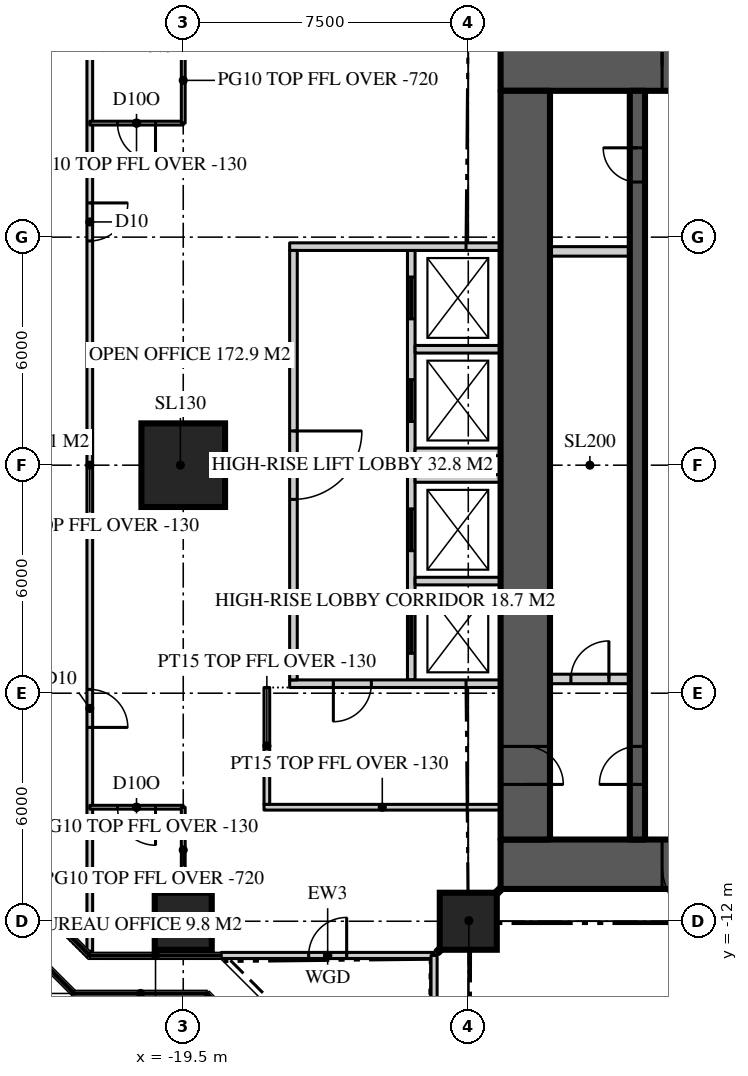
"""IFC4 building model, lengths in metres.
Left out: names, types, materials, properties, quantities, classifications, styles, units other than length and angle.
Written with IfcOpenShell. Run it as: python <this file> out.ifc"""

import sys

from ifc_helpers import new_model, si_unit, direction, frame, frame_2d, origin, origin_2d, place, context, subcontext, project, spatial, rectangle, extrude, element, fill, save


model = new_model("IFC4")
c1 = context("Model", 3, precision=1e-05, world=origin(), true_north=direction((0.0, 1.0)))
c2 = subcontext(c1, "Body", "Model", "MODEL_VIEW")
j1 = project(units=[si_unit("LENGTHUNIT", "METRE"), si_unit("PLANEANGLEUNIT", "RADIAN")], contexts=[c1])
p1 = place(None, origin())
s1 = spatial("IfcSite", under=j1, at=p1, CompositionType="ELEMENT")
p2 = place(p1, origin())
s2 = spatial("IfcBuilding", under=s1, at=p2, CompositionType="ELEMENT")
p3 = place(p2, frame((0.0, 0.0, 240.0)))
s3 = spatial("IfcBuildingStorey", under=s2, at=p3, CompositionType="ELEMENT", Elevation=240.0)
p4 = place(p3, frame((-11.15, 10.5, 0.0), z_axis=(0.0, 0.0, 1.0), x_axis=(1.0, 0.0, 0.0)))
e1 = element("IfcWall", 1, at=p4, inside=s3, PredefinedType="SHEAR", context=c2, shape_type="SweptSolid", body=[
    extrude(rectangle(XDim=22.3, YDim=1.3, at=frame_2d((11.15, 0.0))), origin(), (0.0, 0.0, 1.0), 3.9),
])
p5 = place(p4, frame((4.25, 0.0, 0.0)))
e2 = element("IfcOpeningElement", 2, at=p5, cuts=e1, PredefinedType="OPENING", context=c2, shape_type="SweptSolid", body=[
    extrude(rectangle(XDim=1.8, YDim=2.2, at=frame_2d((0.9, 1.1))), frame((0.0, 0.66, 0.0), z_axis=(0.0, -1.0, 0.0), x_axis=(1.0, 0.0, 0.0)), (0.0, 0.0, 1.0), 1.32),
])
p6 = place(p4, frame((16.25, 0.0, 0.0)))
e3 = element("IfcOpeningElement", 3, at=p6, cuts=e1, PredefinedType="OPENING", context=c2, shape_type="SweptSolid", body=[
    extrude(rectangle(XDim=1.8, YDim=2.2, at=frame_2d((0.9, 1.1))), frame((0.0, 0.66, 0.0), z_axis=(0.0, -1.0, 0.0), x_axis=(1.0, 0.0, 0.0)), (0.0, 0.0, 1.0), 1.32),
])
p7 = place(p3, frame((11.15, -10.5, 0.0), z_axis=(0.0, 0.0, 1.0), x_axis=(-1.0, 0.0, 0.0)))
e4 = element("IfcWall", 4, at=p7, inside=s3, PredefinedType="SHEAR", context=c2, shape_type="SweptSolid", body=[
    extrude(rectangle(XDim=22.3, YDim=1.3, at=frame_2d((11.15, 0.0))), origin(), (0.0, 0.0, 1.0), 3.9),
])
p8 = place(p7, frame((16.25, 0.0, 0.0)))
e5 = element("IfcOpeningElement", 5, at=p8, cuts=e4, PredefinedType="OPENING", context=c2, shape_type="SweptSolid", body=[
    extrude(rectangle(XDim=1.8, YDim=2.2, at=frame_2d((0.9, 1.1))), frame((0.0, 0.66, 0.0), z_axis=(0.0, -1.0, 0.0), x_axis=(1.0, 0.0, 0.0)), (0.0, 0.0, 1.0), 1.32),
])
p9 = place(p7, frame((4.25, 0.0, 0.0)))
e6 = element("IfcOpeningElement", 6, at=p9, cuts=e4, PredefinedType="OPENING", context=c2, shape_type="SweptSolid", body=[
    extrude(rectangle(XDim=1.8, YDim=2.2, at=frame_2d((0.9, 1.1))), frame((0.0, 0.66, 0.0), z_axis=(0.0, -1.0, 0.0), x_axis=(1.0, 0.0, 0.0)), (0.0, 0.0, 1.0), 1.32),
])
p10 = place(p3, frame((-10.5, 9.85, 0.0), z_axis=(0.0, 0.0, 1.0), x_axis=(0.0, -1.0, 0.0)))
e7 = element("IfcWall", 7, at=p10, inside=s3, PredefinedType="SHEAR", context=c2, shape_type="SweptSolid", body=[
    extrude(rectangle(XDim=19.7, YDim=1.3, at=frame_2d((9.85, 0.0))), origin(), (0.0, 0.0, 1.0), 3.9),
])
p11 = place(p10, frame((17.25, 0.0, 0.0)))
e8 = element("IfcOpeningElement", 8, at=p11, cuts=e7, PredefinedType="OPENING", context=c2, shape_type="SweptSolid", body=[
    extrude(rectangle(XDim=1.0, YDim=2.2, at=frame_2d((0.5, 1.1))), frame((0.0, 0.66, 0.0), z_axis=(0.0, -1.0, 0.0), x_axis=(1.0, 0.0, 0.0)), (0.0, 0.0, 1.0), 1.32),
])
for number, where, z_axis, x_axis in (
    (9, (-19.5, -12.0, 0.0), (0.0, 0.0, 1.0), (1.0, 0.0, 0.0)),
    (10, (-12.0, -12.0, 0.0), (0.0, 0.0, 1.0), (1.0, 0.0, 0.0)),
):
    element("IfcColumn", number, at=place(p3, frame(where, z_axis=z_axis, x_axis=x_axis)), inside=s3, PredefinedType="COLUMN", context=c2, shape_type="SweptSolid", body=[
        extrude(rectangle(XDim=1.5, YDim=1.5, at=origin_2d()), origin(), (0.0, 0.0, 1.0), 3.9),
    ])
p12 = place(p3, frame((-19.5, 0.0, 0.0), z_axis=(0.0, 0.0, 1.0), x_axis=(1.0, 0.0, 0.0)))
e11 = element("IfcColumn", 11, at=p12, inside=s3, PredefinedType="COLUMN", context=c2, shape_type="SweptSolid", body=[
    extrude(rectangle(XDim=2.2, YDim=2.2, at=origin_2d()), origin(), (0.0, 0.0, 1.0), 3.9),
])
p13 = place(p3, frame((-18.5, -12.9, 0.0), z_axis=(0.0, 0.0, 1.0), x_axis=(1.0, 0.0, 0.0)))
e12 = element("IfcWall", 12, at=p13, inside=s3, PredefinedType="SOLIDWALL", context=c2, shape_type="SweptSolid", body=[
    extrude(rectangle(XDim=5.6, YDim=0.16, at=frame_2d((2.8, 0.0))), origin(), (0.0, 0.0, 1.0), 3.77),
])
p14 = place(p13, frame((2.3, 0.0, 0.0)))
e13 = element("IfcOpeningElement", 13, at=p14, cuts=e12, PredefinedType="OPENING", context=c2, shape_type="SweptSolid", body=[
    extrude(rectangle(XDim=1.0, YDim=2.2, at=frame_2d((0.5, 1.1))), frame((0.0, 0.09, 0.0), z_axis=(0.0, -1.0, 0.0), x_axis=(1.0, 0.0, 0.0)), (0.0, 0.0, 1.0), 0.18),
])
p15 = place(p3, frame((-12.9, -12.9, 0.0), z_axis=(0.0, 0.0, 1.0), x_axis=(0.0, -1.0, 0.0)))
e14 = element("IfcWall", 14, at=p15, inside=s3, PredefinedType="SOLIDWALL", context=c2, shape_type="SweptSolid", body=[
    extrude(rectangle(XDim=5.6, YDim=0.16, at=frame_2d((2.8, 0.0))), origin(), (0.0, 0.0, 1.0), 3.77),
])
p16 = place(p3, frame((-7.55, -9.85, 0.0), z_axis=(0.0, 0.0, 1.0), x_axis=(0.0, 1.0, 0.0)))
e15 = element("IfcWall", 15, at=p16, inside=s3, PredefinedType="SHEAR", context=c2, shape_type="SweptSolid", body=[
    extrude(rectangle(XDim=19.7, YDim=0.4, at=frame_2d((9.85, 0.0))), origin(), (0.0, 0.0, 1.0), 3.9),
])
p17 = place(p16, frame((1.45, 0.0, 0.0)))
e16 = element("IfcOpeningElement", 16, at=p17, cuts=e15, PredefinedType="OPENING", context=c2, shape_type="SweptSolid", body=[
    extrude(rectangle(XDim=1.0, YDim=2.2, at=frame_2d((0.5, 1.1))), frame((0.0, 0.21, 0.0), z_axis=(0.0, -1.0, 0.0), x_axis=(1.0, 0.0, 0.0)), (0.0, 0.0, 1.0), 0.42),
])
p18 = place(p16, frame((17.3, 0.0, 0.0)))
e17 = element("IfcOpeningElement", 17, at=p18, cuts=e15, PredefinedType="OPENING", context=c2, shape_type="SweptSolid", body=[
    extrude(rectangle(XDim=0.9, YDim=2.1, at=frame_2d((0.45, 1.05))), frame((0.0, 0.21, 0.0), z_axis=(0.0, -1.0, 0.0), x_axis=(1.0, 0.0, 0.0)), (0.0, 0.0, 1.0), 0.42),
])
p19 = place(p3, frame((-9.85, 5.625, 0.0), z_axis=(0.0, 0.0, 1.0), x_axis=(1.0, 0.0, 0.0)))
e18 = element("IfcWall", 18, at=p19, inside=s3, PredefinedType="SOLIDWALL", context=c2, shape_type="SweptSolid", body=[
    extrude(rectangle(XDim=2.1, YDim=0.25, at=frame_2d((1.05, 0.0))), origin(), (0.0, 0.0, 1.0), 3.7),
])
p20 = place(p3, frame((-9.85, -5.625, 0.0), z_axis=(0.0, 0.0, 1.0), x_axis=(1.0, 0.0, 0.0)))
e19 = element("IfcWall", 19, at=p20, inside=s3, PredefinedType="SOLIDWALL", context=c2, shape_type="SweptSolid", body=[
    extrude(rectangle(XDim=2.1, YDim=0.25, at=frame_2d((1.05, 0.0))), origin(), (0.0, 0.0, 1.0), 3.7),
])
p21 = place(p20, frame((0.55, 0.0, 0.0)))
e20 = element("IfcOpeningElement", 20, at=p21, cuts=e19, PredefinedType="OPENING", context=c2, shape_type="SweptSolid", body=[
    extrude(rectangle(XDim=1.0, YDim=2.2, at=frame_2d((0.5, 1.1))), frame((0.0, 0.135, 0.0), z_axis=(0.0, -1.0, 0.0), x_axis=(1.0, 0.0, 0.0)), (0.0, 0.0, 1.0), 0.27),
])
p22 = place(p3, frame((-21.959, 12.786, 0.0), z_axis=(0.0, 0.0, 1.0), x_axis=(0.0, -1.0, 0.0)))
e21 = element("IfcWall", 21, at=p22, inside=s3, PredefinedType="PARTITIONING", context=c2, shape_type="SweptSolid", body=[
    extrude(rectangle(XDim=25.573, YDim=0.15, at=frame_2d((12.786, 0.0))), origin(), (0.0, 0.0, 1.0), 3.77),
])
p23 = place(p22, frame((18.687, 0.0, 0.0)))
e22 = element("IfcOpeningElement", 22, at=p23, cuts=e21, PredefinedType="OPENING", context=c2, shape_type="SweptSolid", body=[
    extrude(rectangle(XDim=1.0, YDim=2.2, at=frame_2d((0.5, 1.1))), frame((0.0, 0.085, 0.0), z_axis=(0.0, -1.0, 0.0), x_axis=(1.0, 0.0, 0.0)), (0.0, 0.0, 1.0), 0.17),
])
p24 = place(p22, frame((5.886, 0.0, 0.0)))
e23 = element("IfcOpeningElement", 23, at=p24, cuts=e21, PredefinedType="OPENING", context=c2, shape_type="SweptSolid", body=[
    extrude(rectangle(XDim=1.0, YDim=2.2, at=frame_2d((0.5, 1.1))), frame((0.0, 0.085, 0.0), z_axis=(0.0, -1.0, 0.0), x_axis=(1.0, 0.0, 0.0)), (0.0, 0.0, 1.0), 0.17),
])
p25 = place(p3, frame((-19.5, -9.0, 0.0), z_axis=(0.0, 0.0, 1.0), x_axis=(-1.0, 0.0, 0.0)))
e24 = element("IfcWall", 24, at=p25, inside=s3, PredefinedType="PARTITIONING", context=c2, shape_type="SweptSolid", body=[
    extrude(rectangle(XDim=2.459, YDim=0.1, at=frame_2d((1.229, 0.0))), origin(), (0.0, 0.0, 1.0), 3.77),
])
p26 = place(p25, frame((0.729, 0.0, 0.0)))
e25 = element("IfcOpeningElement", 25, at=p26, cuts=e24, PredefinedType="OPENING", context=c2, shape_type="SweptSolid", body=[
    extrude(rectangle(XDim=1.0, YDim=2.2, at=frame_2d((0.5, 1.1))), frame((0.0, 0.06, 0.0), z_axis=(0.0, -1.0, 0.0), x_axis=(1.0, 0.0, 0.0)), (0.0, 0.0, 1.0), 0.12),
])
p27 = place(p3, frame((-19.5, -9.0, 0.0), z_axis=(0.0, 0.0, 1.0), x_axis=(0.0, -1.0, 0.0)))
e26 = element("IfcWall", 26, at=p27, inside=s3, PredefinedType="PARTITIONING", context=c2, shape_type="SweptSolid", body=[
    extrude(rectangle(XDim=2.25, YDim=0.1, at=frame_2d((1.125, 0.0))), origin(), (0.0, 0.0, 1.0), 3.18),
])
p28 = place(p3, frame((-19.5, 9.0, 0.0), z_axis=(0.0, 0.0, 1.0), x_axis=(-1.0, 0.0, 0.0)))
e27 = element("IfcWall", 27, at=p28, inside=s3, PredefinedType="PARTITIONING", context=c2, shape_type="SweptSolid", body=[
    extrude(rectangle(XDim=2.459, YDim=0.1, at=frame_2d((1.229, 0.0))), origin(), (0.0, 0.0, 1.0), 3.77),
])
p29 = place(p28, frame((0.729, 0.0, 0.0)))
e28 = element("IfcOpeningElement", 28, at=p29, cuts=e27, PredefinedType="OPENING", context=c2, shape_type="SweptSolid", body=[
    extrude(rectangle(XDim=1.0, YDim=2.2, at=frame_2d((0.5, 1.1))), frame((0.0, 0.06, 0.0), z_axis=(0.0, -1.0, 0.0), x_axis=(1.0, 0.0, 0.0)), (0.0, 0.0, 1.0), 0.12),
])
p30 = place(p3, frame((-19.5, 9.0, 0.0), z_axis=(0.0, 0.0, 1.0), x_axis=(0.0, 1.0, 0.0)))
e29 = element("IfcWall", 29, at=p30, inside=s3, PredefinedType="PARTITIONING", context=c2, shape_type="SweptSolid", body=[
    extrude(rectangle(XDim=2.25, YDim=0.1, at=frame_2d((1.125, 0.0))), origin(), (0.0, 0.0, 1.0), 3.18),
])
p31 = place(p3, frame((-13.5, 5.65, 0.0), z_axis=(0.0, 0.0, 1.0), x_axis=(0.0, -1.0, 0.0)))
e30 = element("IfcWall", 30, at=p31, inside=s3, PredefinedType="SOLIDWALL", context=c2, shape_type="SweptSolid", body=[
    extrude(rectangle(XDim=11.3, YDim=0.2, at=frame_2d((5.65, 0.0))), origin(), (0.0, 0.0, 1.0), 3.7),
])
p32 = place(p31, frame((0.7, 0.0, 0.0)))
e31 = element("IfcOpeningElement", 31, at=p32, cuts=e30, PredefinedType="OPENING", context=c2, shape_type="SweptSolid", body=[
    extrude(rectangle(XDim=1.1, YDim=2.2, at=frame_2d((0.55, 1.1))), frame((0.0, 0.11, 0.0), z_axis=(0.0, -1.0, 0.0), x_axis=(1.0, 0.0, 0.0)), (0.0, 0.0, 1.0), 0.22),
])
p33 = place(p31, frame((3.4, 0.0, 0.0)))
e32 = element("IfcOpeningElement", 32, at=p33, cuts=e30, PredefinedType="OPENING", context=c2, shape_type="SweptSolid", body=[
    extrude(rectangle(XDim=1.1, YDim=2.2, at=frame_2d((0.55, 1.1))), frame((0.0, 0.11, 0.0), z_axis=(0.0, -1.0, 0.0), x_axis=(1.0, 0.0, 0.0)), (0.0, 0.0, 1.0), 0.22),
])
p34 = place(p31, frame((6.8, 0.0, 0.0)))
e33 = element("IfcOpeningElement", 33, at=p34, cuts=e30, PredefinedType="OPENING", context=c2, shape_type="SweptSolid", body=[
    extrude(rectangle(XDim=1.1, YDim=2.2, at=frame_2d((0.55, 1.1))), frame((0.0, 0.11, 0.0), z_axis=(0.0, -1.0, 0.0), x_axis=(1.0, 0.0, 0.0)), (0.0, 0.0, 1.0), 0.22),
])
p35 = place(p31, frame((9.5, 0.0, 0.0)))
e34 = element("IfcOpeningElement", 34, at=p35, cuts=e30, PredefinedType="OPENING", context=c2, shape_type="SweptSolid", body=[
    extrude(rectangle(XDim=1.1, YDim=2.2, at=frame_2d((0.55, 1.1))), frame((0.0, 0.11, 0.0), z_axis=(0.0, -1.0, 0.0), x_axis=(1.0, 0.0, 0.0)), (0.0, 0.0, 1.0), 0.22),
])
p36 = place(p3, frame((-11.15, 5.75, 0.0), z_axis=(0.0, 0.0, 1.0), x_axis=(-1.0, 0.0, 0.0)))
e35 = element("IfcWall", 35, at=p36, inside=s3, PredefinedType="SOLIDWALL", context=c2, shape_type="SweptSolid", body=[
    extrude(rectangle(XDim=5.55, YDim=0.2, at=frame_2d((2.775, 0.0))), origin(), (0.0, 0.0, 1.0), 3.7),
])
p37 = place(p3, frame((-11.15, -5.75, 0.0), z_axis=(0.0, 0.0, 1.0), x_axis=(-1.0, 0.0, 0.0)))
e36 = element("IfcWall", 36, at=p37, inside=s3, PredefinedType="SOLIDWALL", context=c2, shape_type="SweptSolid", body=[
    extrude(rectangle(XDim=5.55, YDim=0.2, at=frame_2d((2.775, 0.0))), origin(), (0.0, 0.0, 1.0), 3.7),
])
p38 = place(p37, frame((3.4, 0.0, 0.0)))
e37 = element("IfcOpeningElement", 37, at=p38, cuts=e36, PredefinedType="OPENING", context=c2, shape_type="SweptSolid", body=[
    extrude(rectangle(XDim=1.0, YDim=2.2, at=frame_2d((0.5, 1.1))), frame((0.0, 0.11, 0.0), z_axis=(0.0, -1.0, 0.0), x_axis=(1.0, 0.0, 0.0)), (0.0, 0.0, 1.0), 0.22),
])
for number, where, z_axis, x_axis in (
    (38, (-11.15, 3.05, 0.0), (0.0, 0.0, 1.0), (-1.0, 0.0, 0.0)),
    (39, (-11.15, 0.35, 0.0), (0.0, 0.0, 1.0), (-1.0, 0.0, 0.0)),
    (40, (-11.15, -0.35, 0.0), (0.0, 0.0, 1.0), (-1.0, 0.0, 0.0)),
    (41, (-11.15, -3.05, 0.0), (0.0, 0.0, 1.0), (-1.0, 0.0, 0.0)),
):
    element("IfcWall", number, at=place(p3, frame(where, z_axis=z_axis, x_axis=x_axis)), inside=s3, PredefinedType="SOLIDWALL", context=c2, shape_type="SweptSolid", body=[
        extrude(rectangle(XDim=2.25, YDim=0.2, at=frame_2d((1.125, 0.0))), origin(), (0.0, 0.0, 1.0), 3.7),
    ])
p39 = place(p3, frame((-16.6, 5.65, 0.0), z_axis=(0.0, 0.0, 1.0), x_axis=(0.0, -1.0, 0.0)))
e42 = element("IfcWall", 42, at=p39, inside=s3, PredefinedType="SOLIDWALL", context=c2, shape_type="SweptSolid", body=[
    extrude(rectangle(XDim=11.3, YDim=0.2, at=frame_2d((5.65, 0.0))), origin(), (0.0, 0.0, 1.0), 3.18),
])
p40 = place(p39, frame((4.75, 0.0, 0.0)))
e43 = element("IfcOpeningElement", 43, at=p40, cuts=e42, PredefinedType="OPENING", context=c2, shape_type="SweptSolid", body=[
    extrude(rectangle(XDim=1.8, YDim=2.2, at=frame_2d((0.9, 1.1))), frame((0.0, 0.11, 0.0), z_axis=(0.0, -1.0, 0.0), x_axis=(1.0, 0.0, 0.0)), (0.0, 0.0, 1.0), 0.22),
])
p41 = place(p3, frame((-11.15, -11.15, 0.0), z_axis=(0.0, 0.0, 1.0), x_axis=(-0.707106781187, -0.707106781187, 0.0)))
e44 = element("IfcWall", 44, at=p41, inside=s3, PredefinedType="PARTITIONING", context=c2, shape_type="SweptSolid", body=[
    extrude(rectangle(XDim=2.362, YDim=0.15, at=frame_2d((1.181, 0.0))), origin(), (0.0, 0.0, 1.0), 3.22),
])
p42 = place(p3, frame((-11.15, -9.0, 0.0), z_axis=(0.0, 0.0, 1.0), x_axis=(-1.0, 0.0, 0.0)))
e45 = element("IfcWall", 45, at=p42, inside=s3, PredefinedType="PARTITIONING", context=c2, shape_type="SweptSolid", body=[
    extrude(rectangle(XDim=6.225, YDim=0.15, at=frame_2d((3.113, 0.0))), origin(), (0.0, 0.0, 1.0), 3.77),
])
p43 = place(p3, frame((-17.3, -5.85, 0.0), z_axis=(0.0, 0.0, 1.0), x_axis=(0.0, -1.0, 0.0)))
e46 = element("IfcWall", 46, at=p43, inside=s3, PredefinedType="PARTITIONING", context=c2, shape_type="SweptSolid", body=[
    extrude(rectangle(XDim=3.075, YDim=0.15, at=frame_2d((1.538, 0.0))), origin(), (0.0, 0.0, 1.0), 3.77),
])
p44 = place(p14, origin())
e47 = element("IfcDoor", 47, at=p44, inside=s3, OperationType="SINGLE_SWING_RIGHT", PredefinedType="DOOR", context=c2, shape_type="SweptSolid", body=[
    extrude(rectangle(XDim=1.0, YDim=2.2, at=frame_2d((0.5, 1.1))), frame((0.0, 0.025, 0.0), z_axis=(0.0, -1.0, 0.0), x_axis=(1.0, 0.0, 0.0)), (0.0, 0.0, 1.0), 0.05),
])
fill(e13, e47)
p45 = place(p5, origin())
e48 = element("IfcDoor", 48, at=p45, inside=s3, OperationType="DOUBLE_DOOR_DOUBLE_SWING", PredefinedType="DOOR", context=c2, shape_type="SweptSolid", body=[
    extrude(rectangle(XDim=1.8, YDim=2.2, at=frame_2d((0.9, 1.1))), frame((0.0, 0.025, 0.0), z_axis=(0.0, -1.0, 0.0), x_axis=(1.0, 0.0, 0.0)), (0.0, 0.0, 1.0), 0.05),
])
fill(e2, e48)
p46 = place(p8, origin())
e49 = element("IfcDoor", 49, at=p46, inside=s3, OperationType="DOUBLE_DOOR_DOUBLE_SWING", PredefinedType="DOOR", context=c2, shape_type="SweptSolid", body=[
    extrude(rectangle(XDim=1.8, YDim=2.2, at=frame_2d((0.9, 1.1))), frame((0.0, 0.025, 0.0), z_axis=(0.0, -1.0, 0.0), x_axis=(1.0, 0.0, 0.0)), (0.0, 0.0, 1.0), 0.05),
])
fill(e5, e49)
p47 = place(p17, origin())
e50 = element("IfcDoor", 50, at=p47, inside=s3, OperationType="SINGLE_SWING_LEFT", PredefinedType="DOOR", context=c2, shape_type="SweptSolid", body=[
    extrude(rectangle(XDim=1.0, YDim=2.2, at=frame_2d((0.5, 1.1))), frame((0.0, 0.025, 0.0), z_axis=(0.0, -1.0, 0.0), x_axis=(1.0, 0.0, 0.0)), (0.0, 0.0, 1.0), 0.05),
])
fill(e16, e50)
p48 = place(p11, origin())
e51 = element("IfcDoor", 51, at=p48, inside=s3, OperationType="SINGLE_SWING_RIGHT", PredefinedType="DOOR", context=c2, shape_type="SweptSolid", body=[
    extrude(rectangle(XDim=1.0, YDim=2.2, at=frame_2d((0.5, 1.1))), frame((0.0, 0.025, 0.0), z_axis=(0.0, -1.0, 0.0), x_axis=(1.0, 0.0, 0.0)), (0.0, 0.0, 1.0), 0.05),
])
fill(e8, e51)
p49 = place(p18, origin())
e52 = element("IfcDoor", 52, at=p49, inside=s3, OperationType="SINGLE_SWING_RIGHT", PredefinedType="DOOR", context=c2, shape_type="SweptSolid", body=[
    extrude(rectangle(XDim=0.9, YDim=2.1, at=frame_2d((0.45, 1.05))), frame((0.0, 0.025, 0.0), z_axis=(0.0, -1.0, 0.0), x_axis=(1.0, 0.0, 0.0)), (0.0, 0.0, 1.0), 0.05),
])
fill(e17, e52)
p50 = place(p23, origin())
e53 = element("IfcDoor", 53, at=p50, inside=s3, OperationType="SINGLE_SWING_RIGHT", PredefinedType="DOOR", context=c2, shape_type="SweptSolid", body=[
    extrude(rectangle(XDim=1.0, YDim=2.2, at=frame_2d((0.5, 1.1))), frame((0.0, 0.025, 0.0), z_axis=(0.0, -1.0, 0.0), x_axis=(1.0, 0.0, 0.0)), (0.0, 0.0, 1.0), 0.05),
])
fill(e22, e53)
p51 = place(p24, origin())
e54 = element("IfcDoor", 54, at=p51, inside=s3, OperationType="SINGLE_SWING_LEFT", PredefinedType="DOOR", context=c2, shape_type="SweptSolid", body=[
    extrude(rectangle(XDim=1.0, YDim=2.2, at=frame_2d((0.5, 1.1))), frame((0.0, 0.025, 0.0), z_axis=(0.0, -1.0, 0.0), x_axis=(1.0, 0.0, 0.0)), (0.0, 0.0, 1.0), 0.05),
])
fill(e23, e54)
p52 = place(p26, origin())
e55 = element("IfcDoor", 55, at=p52, inside=s3, OperationType="SINGLE_SWING_LEFT", PredefinedType="DOOR", context=c2, shape_type="SweptSolid", body=[
    extrude(rectangle(XDim=1.0, YDim=2.2, at=frame_2d((0.5, 1.1))), frame((0.0, 0.025, 0.0), z_axis=(0.0, -1.0, 0.0), x_axis=(1.0, 0.0, 0.0)), (0.0, 0.0, 1.0), 0.05),
])
fill(e25, e55)
p53 = place(p29, origin())
e56 = element("IfcDoor", 56, at=p53, inside=s3, OperationType="SINGLE_SWING_LEFT", PredefinedType="DOOR", context=c2, shape_type="SweptSolid", body=[
    extrude(rectangle(XDim=1.0, YDim=2.2, at=frame_2d((0.5, 1.1))), frame((0.0, 0.025, 0.0), z_axis=(0.0, -1.0, 0.0), x_axis=(1.0, 0.0, 0.0)), (0.0, 0.0, 1.0), 0.05),
])
fill(e28, e56)
p54 = place(p40, origin())
e57 = element("IfcDoor", 57, at=p54, inside=s3, OperationType="DOUBLE_DOOR_DOUBLE_SWING", PredefinedType="DOOR", context=c2, shape_type="SweptSolid", body=[
    extrude(rectangle(XDim=1.8, YDim=2.2, at=frame_2d((0.9, 1.1))), frame((0.0, 0.025, 0.0), z_axis=(0.0, -1.0, 0.0), x_axis=(1.0, 0.0, 0.0)), (0.0, 0.0, 1.0), 0.05),
])
fill(e43, e57)
p55 = place(p32, origin())
e58 = element("IfcDoor", 58, at=p55, inside=s3, OperationType="SLIDING_TO_LEFT", PredefinedType="DOOR", context=c2, shape_type="SweptSolid", body=[
    extrude(rectangle(XDim=1.1, YDim=2.2, at=frame_2d((0.55, 1.1))), frame((0.0, 0.025, 0.0), z_axis=(0.0, -1.0, 0.0), x_axis=(1.0, 0.0, 0.0)), (0.0, 0.0, 1.0), 0.05),
])
fill(e31, e58)
p56 = place(p33, origin())
e59 = element("IfcDoor", 59, at=p56, inside=s3, OperationType="SLIDING_TO_LEFT", PredefinedType="DOOR", context=c2, shape_type="SweptSolid", body=[
    extrude(rectangle(XDim=1.1, YDim=2.2, at=frame_2d((0.55, 1.1))), frame((0.0, 0.025, 0.0), z_axis=(0.0, -1.0, 0.0), x_axis=(1.0, 0.0, 0.0)), (0.0, 0.0, 1.0), 0.05),
])
fill(e32, e59)
p57 = place(p34, origin())
e60 = element("IfcDoor", 60, at=p57, inside=s3, OperationType="SLIDING_TO_LEFT", PredefinedType="DOOR", context=c2, shape_type="SweptSolid", body=[
    extrude(rectangle(XDim=1.1, YDim=2.2, at=frame_2d((0.55, 1.1))), frame((0.0, 0.025, 0.0), z_axis=(0.0, -1.0, 0.0), x_axis=(1.0, 0.0, 0.0)), (0.0, 0.0, 1.0), 0.05),
])
fill(e33, e60)
p58 = place(p35, origin())
e61 = element("IfcDoor", 61, at=p58, inside=s3, OperationType="SLIDING_TO_LEFT", PredefinedType="DOOR", context=c2, shape_type="SweptSolid", body=[
    extrude(rectangle(XDim=1.1, YDim=2.2, at=frame_2d((0.55, 1.1))), frame((0.0, 0.025, 0.0), z_axis=(0.0, -1.0, 0.0), x_axis=(1.0, 0.0, 0.0)), (0.0, 0.0, 1.0), 0.05),
])
fill(e34, e61)
p59 = place(p38, origin())
e62 = element("IfcDoor", 62, at=p59, inside=s3, OperationType="SINGLE_SWING_RIGHT", PredefinedType="DOOR", context=c2, shape_type="SweptSolid", body=[
    extrude(rectangle(XDim=1.0, YDim=2.2, at=frame_2d((0.5, 1.1))), frame((0.0, 0.025, 0.0), z_axis=(0.0, -1.0, 0.0), x_axis=(1.0, 0.0, 0.0)), (0.0, 0.0, 1.0), 0.05),
])
fill(e37, e62)
p60 = place(p21, origin())
e63 = element("IfcDoor", 63, at=p60, inside=s3, OperationType="SINGLE_SWING_RIGHT", PredefinedType="DOOR", context=c2, shape_type="SweptSolid", body=[
    extrude(rectangle(XDim=1.0, YDim=2.2, at=frame_2d((0.5, 1.1))), frame((0.0, 0.025, 0.0), z_axis=(0.0, -1.0, 0.0), x_axis=(1.0, 0.0, 0.0)), (0.0, 0.0, 1.0), 0.05),
])
fill(e20, e63)
save(model, sys.argv[1])
